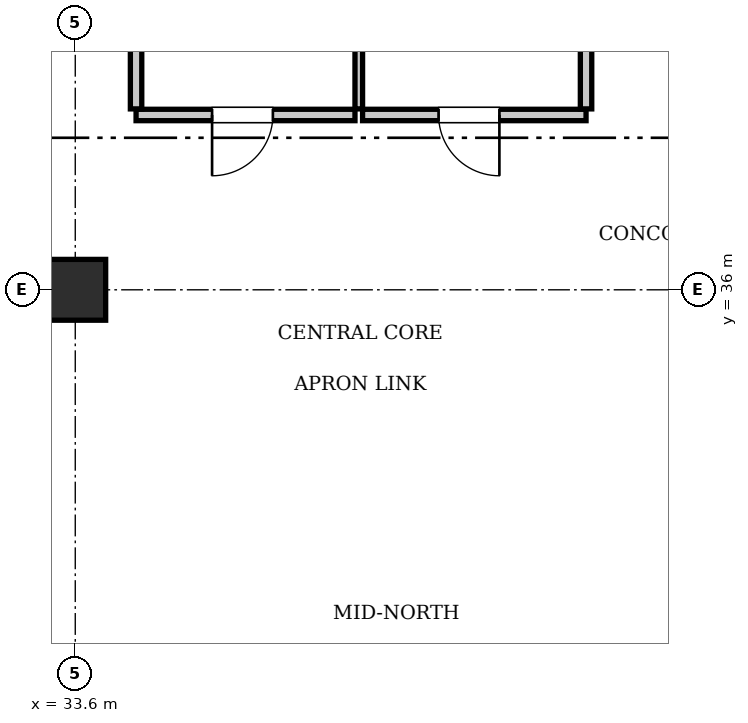
"""IFC4 building model, lengths in metres.
Left out: names, types, materials, properties, quantities, classifications, styles, units other than length and angle.
Written with IfcOpenShell. Run it as: python <this file> out.ifc"""

import sys

from ifc_helpers import new_model, si_unit, direction, frame, frame_2d, origin, origin_2d, place, context, subcontext, project, spatial, rectangle, extrude, element, fill, save


model = new_model("IFC4")
c1 = context("Model", 3, precision=1e-05, world=origin(), true_north=direction((0.0, 1.0)))
c2 = subcontext(c1, "Body", "Model", "MODEL_VIEW")
j1 = project(units=[si_unit("LENGTHUNIT", "METRE"), si_unit("PLANEANGLEUNIT", "RADIAN")], contexts=[c1])
p1 = place(None, origin())
s1 = spatial("IfcSite", under=j1, at=p1, CompositionType="ELEMENT")
p2 = place(p1, origin())
s2 = spatial("IfcBuilding", under=s1, at=p2, CompositionType="ELEMENT")
p3 = place(p2, frame((0.0, 0.0, 289.45)))
s3 = spatial("IfcBuildingStorey", under=s2, at=p3, CompositionType="ELEMENT", Elevation=289.45)
p4 = place(p3, frame((33.6, 36.0, 0.0), z_axis=(0.0, 0.0, 1.0), x_axis=(1.0, 0.0, 0.0)))
e1 = element("IfcColumn", 1, at=p4, inside=s3, PredefinedType="COLUMN", context=c2, shape_type="SweptSolid", body=[
    extrude(rectangle(XDim=0.8, YDim=0.8, at=origin_2d()), origin(), (0.0, 0.0, 1.0), 3.85),
])
p5 = place(p3, frame((34.4, 38.3, 0.0), z_axis=(0.0, 0.0, 1.0), x_axis=(1.0, 0.0, 0.0)))
e2 = element("IfcWall", 2, at=p5, inside=s3, PredefinedType="PARTITIONING", context=c2, shape_type="SweptSolid", body=[
    extrude(rectangle(XDim=2.88, YDim=0.15, at=frame_2d((1.44, 0.0))), origin(), (0.0, 0.0, 1.0), 3.61),
])
p6 = place(p5, frame((1.0, 0.0, 0.0)))
e3 = element("IfcOpeningElement", 3, at=p6, cuts=e2, PredefinedType="OPENING", context=c2, shape_type="SweptSolid", body=[
    extrude(rectangle(XDim=0.8, YDim=2.05, at=frame_2d((0.4, 1.025))), frame((0.0, 0.085, 0.0), z_axis=(0.0, -1.0, 0.0), x_axis=(1.0, 0.0, 0.0)), (0.0, 0.0, 1.0), 0.17),
])
p7 = place(p3, frame((37.38, 38.3, 0.0), z_axis=(0.0, 0.0, 1.0), x_axis=(1.0, 0.0, 0.0)))
e4 = element("IfcWall", 4, at=p7, inside=s3, PredefinedType="PARTITIONING", context=c2, shape_type="SweptSolid", body=[
    extrude(rectangle(XDim=2.94, YDim=0.15, at=frame_2d((1.47, 0.0))), origin(), (0.0, 0.0, 1.0), 3.61),
])
p8 = place(p7, frame((1.0, 0.0, 0.0)))
e5 = element("IfcOpeningElement", 5, at=p8, cuts=e4, PredefinedType="OPENING", context=c2, shape_type="SweptSolid", body=[
    extrude(rectangle(XDim=0.8, YDim=2.05, at=frame_2d((0.4, 1.025))), frame((0.0, 0.085, 0.0), z_axis=(0.0, -1.0, 0.0), x_axis=(1.0, 0.0, 0.0)), (0.0, 0.0, 1.0), 0.17),
])
p9 = place(p3, frame((34.4, 38.38, 0.0), z_axis=(0.0, 0.0, 1.0), x_axis=(0.0, 1.0, 0.0)))
e6 = element("IfcWall", 6, at=p9, inside=s3, PredefinedType="PARTITIONING", context=c2, shape_type="SweptSolid", body=[
    extrude(rectangle(XDim=2.84, YDim=0.15, at=frame_2d((1.42, 0.0))), origin(), (0.0, 0.0, 1.0), 3.61),
])
p10 = place(p3, frame((37.33, 38.38, 0.0), z_axis=(0.0, 0.0, 1.0), x_axis=(0.0, 1.0, 0.0)))
e7 = element("IfcWall", 7, at=p10, inside=s3, PredefinedType="PARTITIONING", context=c2, shape_type="SweptSolid", body=[
    extrude(rectangle(XDim=2.84, YDim=0.1, at=frame_2d((1.42, 0.0))), origin(), (0.0, 0.0, 1.0), 3.61),
])
p11 = place(p3, frame((40.32, 38.38, 0.0), z_axis=(0.0, 0.0, 1.0), x_axis=(0.0, 1.0, 0.0)))
e8 = element("IfcWall", 8, at=p11, inside=s3, PredefinedType="PARTITIONING", context=c2, shape_type="SweptSolid", body=[
    extrude(rectangle(XDim=2.84, YDim=0.15, at=frame_2d((1.42, 0.0))), origin(), (0.0, 0.0, 1.0), 3.61),
])
p12 = place(p6, frame((0.8, 0.0, 0.0), z_axis=(0.0, 0.0, 1.0), x_axis=(-1.0, 0.0, 0.0)))
e9 = element("IfcDoor", 9, at=p12, inside=s3, OperationType="SINGLE_SWING_RIGHT", PredefinedType="DOOR", context=c2, shape_type="SweptSolid", body=[
    extrude(rectangle(XDim=0.8, YDim=2.05, at=frame_2d((0.4, 1.025))), frame((0.0, 0.025, 0.0), z_axis=(0.0, -1.0, 0.0), x_axis=(1.0, 0.0, 0.0)), (0.0, 0.0, 1.0), 0.05),
])
fill(e3, e9)
p13 = place(p8, frame((0.8, 0.0, 0.0), z_axis=(0.0, 0.0, 1.0), x_axis=(-1.0, 0.0, 0.0)))
e10 = element("IfcDoor", 10, at=p13, inside=s3, OperationType="SINGLE_SWING_LEFT", PredefinedType="DOOR", context=c2, shape_type="SweptSolid", body=[
    extrude(rectangle(XDim=0.8, YDim=2.05, at=frame_2d((0.4, 1.025))), frame((0.0, 0.025, 0.0), z_axis=(0.0, -1.0, 0.0), x_axis=(1.0, 0.0, 0.0)), (0.0, 0.0, 1.0), 0.05),
])
fill(e5, e10)
save(model, sys.argv[1])
